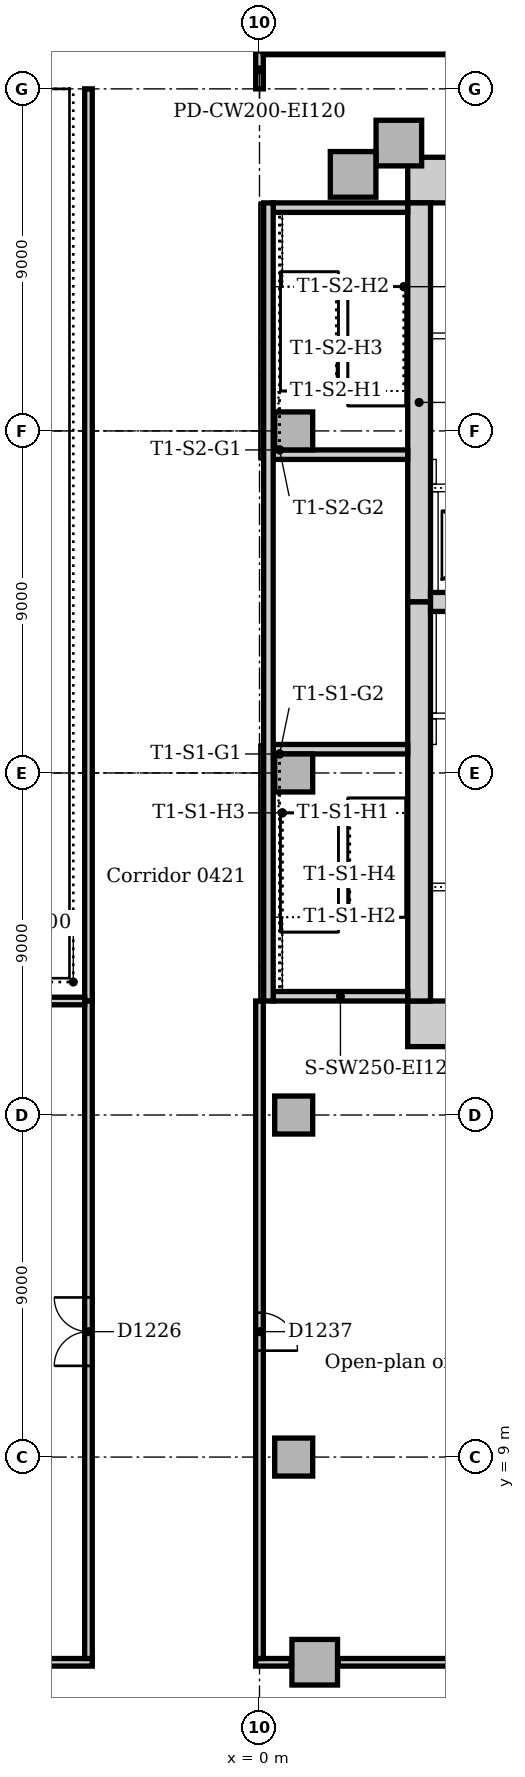
"""IFC4 building model, lengths in metres.
Left out: names, types, materials, properties, quantities, classifications, styles, units other than length and angle.
Written with IfcOpenShell. Run it as: python <this file> out.ifc"""

import sys

from ifc_helpers import new_model, si_unit, direction, frame, frame_2d, origin, origin_2d, place, context, subcontext, project, spatial, rectangle, extrude, element, fill, save


model = new_model("IFC4")
c1 = context("Model", 3, precision=1e-05, world=origin(), true_north=direction((0.0, 1.0)))
c2 = subcontext(c1, "Body", "Model", "MODEL_VIEW")
j1 = project(units=[si_unit("LENGTHUNIT", "METRE"), si_unit("PLANEANGLEUNIT", "RADIAN")], contexts=[c1])
p1 = place(None, origin())
s1 = spatial("IfcSite", under=j1, at=p1, CompositionType="ELEMENT")
p2 = place(p1, origin())
s2 = spatial("IfcBuilding", under=s1, at=p2, CompositionType="ELEMENT")
p3 = place(p2, frame((0.0, 0.0, 21.0)))
s3 = spatial("IfcBuildingStorey", under=s2, at=p3, CompositionType="ELEMENT", Elevation=21.0)
for number, where, z_axis, x_axis in (
    (1, (3.9, 20.4, 0.0), (0.0, 0.0, 1.0), (1.0, 0.0, 0.0)),
    (2, (23.7, 42.6, 0.0), (0.0, 0.0, 1.0), (-1.0, 0.0, 0.0)),
):
    element("IfcWall", number, at=place(p3, frame(where, z_axis=z_axis, x_axis=x_axis)), inside=s3, PredefinedType="SOLIDWALL", context=c2, shape_type="SweptSolid", body=[
        extrude(rectangle(XDim=19.8, YDim=1.2, at=frame_2d((9.9, 0.0))), origin(), (0.0, 0.0, 1.0), 5.0),
    ])
p4 = place(p3, frame((4.2, 42.0, 0.0), z_axis=(0.0, 0.0, 1.0), x_axis=(0.0, -1.0, 0.0)))
e3 = element("IfcWall", 3, at=p4, inside=s3, PredefinedType="SOLIDWALL", context=c2, shape_type="SweptSolid", body=[
    extrude(rectangle(XDim=10.5, YDim=0.6, at=frame_2d((5.25, 0.0))), origin(), (0.0, 0.0, 1.0), 5.0),
])
p5 = place(p4, frame((5.3, 0.0, 0.0)))
e4 = element("IfcOpeningElement", 4, at=p5, cuts=e3, PredefinedType="OPENING", context=c2, shape_type="SweptSolid", body=[
    extrude(rectangle(XDim=1.0, YDim=2.1, at=frame_2d((0.5, 1.05))), frame((0.0, 0.31, 0.0), z_axis=(0.0, -1.0, 0.0), x_axis=(1.0, 0.0, 0.0)), (0.0, 0.0, 1.0), 0.62),
])
p6 = place(p3, frame((4.2, 31.5, 0.0), z_axis=(0.0, 0.0, 1.0), x_axis=(0.0, -1.0, 0.0)))
e5 = element("IfcWall", 5, at=p6, inside=s3, PredefinedType="SOLIDWALL", context=c2, shape_type="SweptSolid", body=[
    extrude(rectangle(XDim=10.5, YDim=0.6, at=frame_2d((5.25, 0.0))), origin(), (0.0, 0.0, 1.0), 5.0),
])
p7 = place(p6, frame((4.25, 0.0, 0.0)))
e6 = element("IfcOpeningElement", 6, at=p7, cuts=e5, PredefinedType="OPENING", context=c2, shape_type="SweptSolid", body=[
    extrude(rectangle(XDim=1.0, YDim=2.1, at=frame_2d((0.5, 1.05))), frame((0.0, 0.31, 0.0), z_axis=(0.0, -1.0, 0.0), x_axis=(1.0, 0.0, 0.0)), (0.0, 0.0, 1.0), 0.62),
])
p8 = place(p3, frame((4.5, 31.5, 0.0), z_axis=(0.0, 0.0, 1.0), x_axis=(1.0, 0.0, 0.0)))
e7 = element("IfcWall", 7, at=p8, inside=s3, PredefinedType="SOLIDWALL", context=c2, shape_type="SweptSolid", body=[
    extrude(rectangle(XDim=18.0, YDim=0.5, at=frame_2d((9.0, 0.0))), origin(), (0.0, 0.0, 1.0), 5.0),
])
p9 = place(p3, frame((0.36, 21.125, 0.0), z_axis=(0.0, 0.0, 1.0), x_axis=(1.0, 0.0, 0.0)))
e8 = element("IfcWall", 8, at=p9, inside=s3, PredefinedType="SOLIDWALL", context=c2, shape_type="SweptSolid", body=[
    extrude(rectangle(XDim=3.54, YDim=0.25, at=frame_2d((1.77, 0.0))), origin(), (0.0, 0.0, 1.0), 5.0),
])
p10 = place(p3, frame((3.9, 27.625, 0.0), z_axis=(0.0, 0.0, 1.0), x_axis=(-1.0, 0.0, 0.0)))
e9 = element("IfcWall", 9, at=p10, inside=s3, PredefinedType="SOLIDWALL", context=c2, shape_type="SweptSolid", body=[
    extrude(rectangle(XDim=3.54, YDim=0.25, at=frame_2d((1.77, 0.0))), origin(), (0.0, 0.0, 1.0), 5.0),
])
p11 = place(p10, frame((0.4, 0.0, 0.0)))
e10 = element("IfcOpeningElement", 10, at=p11, cuts=e9, PredefinedType="OPENING", context=c2, shape_type="SweptSolid", body=[
    extrude(rectangle(XDim=1.0, YDim=2.1, at=frame_2d((0.5, 1.05))), frame((0.0, 0.135, 0.0), z_axis=(0.0, -1.0, 0.0), x_axis=(1.0, 0.0, 0.0)), (0.0, 0.0, 1.0), 0.27),
])
p12 = place(p3, frame((0.36, 35.375, 0.0), z_axis=(0.0, 0.0, 1.0), x_axis=(1.0, 0.0, 0.0)))
e11 = element("IfcWall", 11, at=p12, inside=s3, PredefinedType="SOLIDWALL", context=c2, shape_type="SweptSolid", body=[
    extrude(rectangle(XDim=3.54, YDim=0.25, at=frame_2d((1.77, 0.0))), origin(), (0.0, 0.0, 1.0), 5.0),
])
p13 = place(p12, frame((2.14, 0.0, 0.0)))
e12 = element("IfcOpeningElement", 12, at=p13, cuts=e11, PredefinedType="OPENING", context=c2, shape_type="SweptSolid", body=[
    extrude(rectangle(XDim=1.0, YDim=2.1, at=frame_2d((0.5, 1.05))), frame((0.0, 0.135, 0.0), z_axis=(0.0, -1.0, 0.0), x_axis=(1.0, 0.0, 0.0)), (0.0, 0.0, 1.0), 0.27),
])
p14 = place(p3, frame((3.9, 41.875, 0.0), z_axis=(0.0, 0.0, 1.0), x_axis=(-1.0, 0.0, 0.0)))
e13 = element("IfcWall", 13, at=p14, inside=s3, PredefinedType="SOLIDWALL", context=c2, shape_type="SweptSolid", body=[
    extrude(rectangle(XDim=3.54, YDim=0.25, at=frame_2d((1.77, 0.0))), origin(), (0.0, 0.0, 1.0), 5.0),
])
p15 = place(p3, frame((0.235, 21.0, 0.0), z_axis=(0.0, 0.0, 1.0), x_axis=(0.0, 1.0, 0.0)))
e14 = element("IfcWall", 14, at=p15, inside=s3, PredefinedType="SOLIDWALL", context=c2, shape_type="SweptSolid", body=[
    extrude(rectangle(XDim=21.0, YDim=0.25, at=frame_2d((10.5, 0.0))), origin(), (0.0, 0.0, 1.0), 5.0),
])
for number, where, z_axis, x_axis in (
    (15, (3.667, 43.574, 0.0), (0.0, 0.0, 1.0), (1.0, 0.0, 0.0)),
    (16, (2.463, 42.75, 0.0), (0.0, 0.0, 1.0), (1.0, 0.0, 0.0)),
    (17, (1.453, 3.602, 0.0), (0.0, 0.0, 1.0), (1.0, 0.0, 0.0)),
):
    element("IfcColumn", number, at=place(p3, frame(where, z_axis=z_axis, x_axis=x_axis)), inside=s3, PredefinedType="COLUMN", context=c2, shape_type="SweptSolid", body=[
        extrude(rectangle(XDim=1.2, YDim=1.2, at=origin_2d()), origin(), (0.0, 0.0, 1.0), 4.85),
    ])
for number, where, z_axis, x_axis in (
    (18, (0.9, 9.0, 0.0), (0.0, 0.0, 1.0), (1.0, 0.0, 0.0)),
    (19, (0.9, 18.0, 0.0), (0.0, 0.0, 1.0), (1.0, 0.0, 0.0)),
):
    element("IfcColumn", number, at=place(p3, frame(where, z_axis=z_axis, x_axis=x_axis)), inside=s3, PredefinedType="COLUMN", context=c2, shape_type="SweptSolid", body=[
        extrude(rectangle(XDim=1.0, YDim=1.0, at=origin_2d()), origin(), (0.0, 0.0, 1.0), 4.85),
    ])
for number, where, z_axis, x_axis in (
    (20, (0.9, 27.0, 0.0), (0.0, 0.0, 1.0), (1.0, 0.0, 0.0)),
    (21, (0.9, 36.0, 0.0), (0.0, 0.0, 1.0), (1.0, 0.0, 0.0)),
):
    element("IfcColumn", number, at=place(p3, frame(where, z_axis=z_axis, x_axis=x_axis)), inside=s3, PredefinedType="COLUMN", context=c2, shape_type="SweptSolid", body=[
        extrude(rectangle(XDim=1.0, YDim=1.0, at=origin_2d()), origin(), (0.0, 0.0, 1.0), 5.0),
    ])
p16 = place(p3, frame((-0.1, 3.6, 0.0), z_axis=(0.0, 0.0, 1.0), x_axis=(1.0, 0.0, 0.0)))
e22 = element("IfcWall", 22, at=p16, inside=s3, PredefinedType="PARTITIONING", context=c2, shape_type="SweptSolid", body=[
    extrude(rectangle(XDim=0.933, YDim=0.2, at=frame_2d((0.467, 0.0))), origin(), (0.0, 0.0, 1.0), 4.7),
])
p17 = place(p3, frame((2.073, 3.6, 0.0), z_axis=(0.0, 0.0, 1.0), x_axis=(1.0, 0.0, 0.0)))
e23 = element("IfcWall", 23, at=p17, inside=s3, PredefinedType="PARTITIONING", context=c2, shape_type="SweptSolid", body=[
    extrude(rectangle(XDim=6.927, YDim=0.2, at=frame_2d((3.463, 0.0))), origin(), (0.0, 0.0, 1.0), 4.85),
])
p18 = place(p3, frame((0.0, 45.0, 0.0), z_axis=(0.0, 0.0, 1.0), x_axis=(0.0, 1.0, 0.0)))
e24 = element("IfcWall", 24, at=p18, inside=s3, PredefinedType="PARTITIONING", context=c2, shape_type="SweptSolid", body=[
    extrude(rectangle(XDim=1.0, YDim=0.2, at=frame_2d((0.5, 0.0))), origin(), (0.0, 0.0, 1.0), 4.7),
])
p19 = place(p3, frame((0.1, 46.0, 0.0), z_axis=(0.0, 0.0, 1.0), x_axis=(1.0, 0.0, 0.0)))
e25 = element("IfcWall", 25, at=p19, inside=s3, PredefinedType="PARTITIONING", context=c2, shape_type="SweptSolid", body=[
    extrude(rectangle(XDim=8.9, YDim=0.2, at=frame_2d((4.45, 0.0))), origin(), (0.0, 0.0, 1.0), 4.7),
])
p20 = place(p19, frame((3.9, 0.0, 0.0)))
e26 = element("IfcOpeningElement", 26, at=p20, cuts=e25, PredefinedType="OPENING", context=c2, shape_type="SweptSolid", body=[
    extrude(rectangle(XDim=1.0, YDim=2.1, at=frame_2d((0.5, 1.05))), frame((0.0, 0.11, 0.0), z_axis=(0.0, -1.0, 0.0), x_axis=(1.0, 0.0, 0.0)), (0.0, 0.0, 1.0), 0.22),
])
p21 = place(p3, frame((-18.0, 3.6, 0.0), z_axis=(0.0, 0.0, 1.0), x_axis=(1.0, 0.0, 0.0)))
e27 = element("IfcWall", 27, at=p21, inside=s3, PredefinedType="PARTITIONING", context=c2, shape_type="SweptSolid", body=[
    extrude(rectangle(XDim=13.6, YDim=0.2, at=frame_2d((6.8, 0.0))), origin(), (0.0, 0.0, 1.0), 4.7),
])
p22 = place(p3, frame((-4.5, 21.0, 0.0), z_axis=(0.0, 0.0, 1.0), x_axis=(0.0, 1.0, 0.0)))
e28 = element("IfcWall", 28, at=p22, inside=s3, PredefinedType="PARTITIONING", context=c2, shape_type="SweptSolid", body=[
    extrude(rectangle(XDim=24.0, YDim=0.2, at=frame_2d((12.0, 0.0))), origin(), (0.0, 0.0, 1.0), 4.7),
])
p23 = place(p3, frame((-4.5, 3.7, 0.0), z_axis=(0.0, 0.0, 1.0), x_axis=(0.0, 1.0, 0.0)))
e29 = element("IfcWall", 29, at=p23, inside=s3, PredefinedType="PARTITIONING", context=c2, shape_type="SweptSolid", body=[
    extrude(rectangle(XDim=17.3, YDim=0.2, at=frame_2d((8.65, 0.0))), origin(), (0.0, 0.0, 1.0), 4.7),
])
p24 = place(p23, frame((7.7, 0.0, 0.0)))
e30 = element("IfcOpeningElement", 30, at=p24, cuts=e29, PredefinedType="OPENING", context=c2, shape_type="SweptSolid", body=[
    extrude(rectangle(XDim=1.8, YDim=2.1, at=frame_2d((0.9, 1.05))), frame((0.0, 0.11, 0.0), z_axis=(0.0, -1.0, 0.0), x_axis=(1.0, 0.0, 0.0)), (0.0, 0.0, 1.0), 0.22),
])
p25 = place(p3, frame((0.0, 3.7, 0.0), z_axis=(0.0, 0.0, 1.0), x_axis=(0.0, 1.0, 0.0)))
e31 = element("IfcWall", 31, at=p25, inside=s3, PredefinedType="PARTITIONING", context=c2, shape_type="SweptSolid", body=[
    extrude(rectangle(XDim=17.3, YDim=0.2, at=frame_2d((8.65, 0.0))), origin(), (0.0, 0.0, 1.0), 4.85),
])
p26 = place(p25, frame((8.1, 0.0, 0.0)))
e32 = element("IfcOpeningElement", 32, at=p26, cuts=e31, PredefinedType="OPENING", context=c2, shape_type="SweptSolid", body=[
    extrude(rectangle(XDim=1.0, YDim=2.1, at=frame_2d((0.5, 1.05))), frame((0.0, 0.11, 0.0), z_axis=(0.0, -1.0, 0.0), x_axis=(1.0, 0.0, 0.0)), (0.0, 0.0, 1.0), 0.22),
])
p27 = place(p3, frame((-18.0, 21.0, 0.0), z_axis=(0.0, 0.0, 1.0), x_axis=(1.0, 0.0, 0.0)))
e33 = element("IfcWall", 33, at=p27, inside=s3, PredefinedType="PARTITIONING", context=c2, shape_type="SweptSolid", body=[
    extrude(rectangle(XDim=13.4, YDim=0.2, at=frame_2d((6.7, 0.0))), origin(), (0.0, 0.0, 1.0), 4.7),
])
for number, where, z_axis, x_axis in (
    (34, (0.48, 21.25, 0.0), (0.0, 0.0, 1.0), (0.0, 1.0, 0.0)),
    (35, (0.48, 39.795, 0.0), (0.0, 0.0, 1.0), (0.0, 1.0, 0.0)),
):
    element("IfcWall", number, at=place(p3, frame(where, z_axis=z_axis, x_axis=x_axis)), inside=s3, PredefinedType="STANDARD", context=c2, shape_type="SweptSolid", body=[
        extrude(rectangle(XDim=1.955, YDim=0.24, at=frame_2d((0.978, 0.0))), origin(), (0.0, 0.0, 1.0), 5.0),
    ])
p28 = place(p3, frame((4.5, 24.0, 0.0), z_axis=(0.0, 0.0, 1.0), x_axis=(1.0, 0.0, 0.0)))
e36 = element("IfcWall", 36, at=p28, inside=s3, PredefinedType="PARTITIONING", context=c2, shape_type="SweptSolid", body=[
    extrude(rectangle(XDim=18.0, YDim=0.2, at=frame_2d((9.0, 0.0))), origin(), (0.0, 0.0, 1.0), 4.85),
])
p29 = place(p28, frame((0.95, 0.0, 0.0)))
e37 = element("IfcOpeningElement", 37, at=p29, cuts=e36, PredefinedType="OPENING", context=c2, shape_type="SweptSolid", body=[
    extrude(rectangle(XDim=1.1, YDim=2.1, at=frame_2d((0.55, 1.05))), frame((0.0, 0.11, 0.0), z_axis=(0.0, -1.0, 0.0), x_axis=(1.0, 0.0, 0.0)), (0.0, 0.0, 1.0), 0.22),
])
p30 = place(p28, frame((3.95, 0.0, 0.0)))
e38 = element("IfcOpeningElement", 38, at=p30, cuts=e36, PredefinedType="OPENING", context=c2, shape_type="SweptSolid", body=[
    extrude(rectangle(XDim=1.1, YDim=2.1, at=frame_2d((0.55, 1.05))), frame((0.0, 0.11, 0.0), z_axis=(0.0, -1.0, 0.0), x_axis=(1.0, 0.0, 0.0)), (0.0, 0.0, 1.0), 0.22),
])
p31 = place(p28, frame((6.95, 0.0, 0.0)))
e39 = element("IfcOpeningElement", 39, at=p31, cuts=e36, PredefinedType="OPENING", context=c2, shape_type="SweptSolid", body=[
    extrude(rectangle(XDim=1.1, YDim=2.1, at=frame_2d((0.55, 1.05))), frame((0.0, 0.11, 0.0), z_axis=(0.0, -1.0, 0.0), x_axis=(1.0, 0.0, 0.0)), (0.0, 0.0, 1.0), 0.22),
])
p32 = place(p28, frame((9.95, 0.0, 0.0)))
e40 = element("IfcOpeningElement", 40, at=p32, cuts=e36, PredefinedType="OPENING", context=c2, shape_type="SweptSolid", body=[
    extrude(rectangle(XDim=1.1, YDim=2.1, at=frame_2d((0.55, 1.05))), frame((0.0, 0.11, 0.0), z_axis=(0.0, -1.0, 0.0), x_axis=(1.0, 0.0, 0.0)), (0.0, 0.0, 1.0), 0.22),
])
p33 = place(p28, frame((12.95, 0.0, 0.0)))
e41 = element("IfcOpeningElement", 41, at=p33, cuts=e36, PredefinedType="OPENING", context=c2, shape_type="SweptSolid", body=[
    extrude(rectangle(XDim=1.1, YDim=2.1, at=frame_2d((0.55, 1.05))), frame((0.0, 0.11, 0.0), z_axis=(0.0, -1.0, 0.0), x_axis=(1.0, 0.0, 0.0)), (0.0, 0.0, 1.0), 0.22),
])
p34 = place(p28, frame((15.95, 0.0, 0.0)))
e42 = element("IfcOpeningElement", 42, at=p34, cuts=e36, PredefinedType="OPENING", context=c2, shape_type="SweptSolid", body=[
    extrude(rectangle(XDim=1.1, YDim=2.1, at=frame_2d((0.55, 1.05))), frame((0.0, 0.11, 0.0), z_axis=(0.0, -1.0, 0.0), x_axis=(1.0, 0.0, 0.0)), (0.0, 0.0, 1.0), 0.22),
])
p35 = place(p3, frame((4.5, 34.5, 0.0), z_axis=(0.0, 0.0, 1.0), x_axis=(1.0, 0.0, 0.0)))
e43 = element("IfcWall", 43, at=p35, inside=s3, PredefinedType="PARTITIONING", context=c2, shape_type="SweptSolid", body=[
    extrude(rectangle(XDim=18.0, YDim=0.2, at=frame_2d((9.0, 0.0))), origin(), (0.0, 0.0, 1.0), 4.85),
])
p36 = place(p35, frame((0.95, 0.0, 0.0)))
e44 = element("IfcOpeningElement", 44, at=p36, cuts=e43, PredefinedType="OPENING", context=c2, shape_type="SweptSolid", body=[
    extrude(rectangle(XDim=1.1, YDim=2.1, at=frame_2d((0.55, 1.05))), frame((0.0, 0.11, 0.0), z_axis=(0.0, -1.0, 0.0), x_axis=(1.0, 0.0, 0.0)), (0.0, 0.0, 1.0), 0.22),
])
p37 = place(p35, frame((3.95, 0.0, 0.0)))
e45 = element("IfcOpeningElement", 45, at=p37, cuts=e43, PredefinedType="OPENING", context=c2, shape_type="SweptSolid", body=[
    extrude(rectangle(XDim=1.1, YDim=2.1, at=frame_2d((0.55, 1.05))), frame((0.0, 0.11, 0.0), z_axis=(0.0, -1.0, 0.0), x_axis=(1.0, 0.0, 0.0)), (0.0, 0.0, 1.0), 0.22),
])
p38 = place(p35, frame((12.95, 0.0, 0.0)))
e46 = element("IfcOpeningElement", 46, at=p38, cuts=e43, PredefinedType="OPENING", context=c2, shape_type="SweptSolid", body=[
    extrude(rectangle(XDim=1.1, YDim=2.1, at=frame_2d((0.55, 1.05))), frame((0.0, 0.11, 0.0), z_axis=(0.0, -1.0, 0.0), x_axis=(1.0, 0.0, 0.0)), (0.0, 0.0, 1.0), 0.22),
])
p39 = place(p35, frame((15.95, 0.0, 0.0)))
e47 = element("IfcOpeningElement", 47, at=p39, cuts=e43, PredefinedType="OPENING", context=c2, shape_type="SweptSolid", body=[
    extrude(rectangle(XDim=1.1, YDim=2.1, at=frame_2d((0.55, 1.05))), frame((0.0, 0.11, 0.0), z_axis=(0.0, -1.0, 0.0), x_axis=(1.0, 0.0, 0.0)), (0.0, 0.0, 1.0), 0.22),
])
p40 = place(p3, frame((4.6, 31.75, 0.0), z_axis=(0.0, 0.0, 1.0), x_axis=(0.0, 1.0, 0.0)))
e48 = element("IfcWall", 48, at=p40, inside=s3, PredefinedType="PARTITIONING", context=c2, shape_type="SweptSolid", body=[
    extrude(rectangle(XDim=2.65, YDim=0.2, at=frame_2d((1.325, 0.0))), origin(), (0.0, 0.0, 1.0), 4.85),
])
p41 = place(p3, frame((4.5, 28.5, 0.0), z_axis=(0.0, 0.0, 1.0), x_axis=(1.0, 0.0, 0.0)))
e49 = element("IfcWall", 49, at=p41, inside=s3, PredefinedType="PARTITIONING", context=c2, shape_type="SweptSolid", body=[
    extrude(rectangle(XDim=18.0, YDim=0.15, at=frame_2d((9.0, 0.0))), origin(), (0.0, 0.0, 1.0), 4.85),
])
p42 = place(p41, frame((4.1, 0.0, 0.0)))
e50 = element("IfcOpeningElement", 50, at=p42, cuts=e49, PredefinedType="OPENING", context=c2, shape_type="SweptSolid", body=[
    extrude(rectangle(XDim=0.9, YDim=2.1, at=frame_2d((0.45, 1.05))), frame((0.0, 0.085, 0.0), z_axis=(0.0, -1.0, 0.0), x_axis=(1.0, 0.0, 0.0)), (0.0, 0.0, 1.0), 0.17),
])
p43 = place(p41, frame((10.8, 0.0, 0.0)))
e51 = element("IfcOpeningElement", 51, at=p43, cuts=e49, PredefinedType="OPENING", context=c2, shape_type="SweptSolid", body=[
    extrude(rectangle(XDim=0.9, YDim=2.1, at=frame_2d((0.45, 1.05))), frame((0.0, 0.085, 0.0), z_axis=(0.0, -1.0, 0.0), x_axis=(1.0, 0.0, 0.0)), (0.0, 0.0, 1.0), 0.17),
])
p44 = place(p41, frame((15.2, 0.0, 0.0)))
e52 = element("IfcOpeningElement", 52, at=p44, cuts=e49, PredefinedType="OPENING", context=c2, shape_type="SweptSolid", body=[
    extrude(rectangle(XDim=0.9, YDim=2.1, at=frame_2d((0.45, 1.05))), frame((0.0, 0.085, 0.0), z_axis=(0.0, -1.0, 0.0), x_axis=(1.0, 0.0, 0.0)), (0.0, 0.0, 1.0), 0.17),
])
p45 = place(p3, frame((4.5, 38.5, 0.0), z_axis=(0.0, 0.0, 1.0), x_axis=(1.0, 0.0, 0.0)))
e53 = element("IfcWall", 53, at=p45, inside=s3, PredefinedType="PARTITIONING", context=c2, shape_type="SweptSolid", body=[
    extrude(rectangle(XDim=11.9, YDim=0.15, at=frame_2d((5.95, 0.0))), origin(), (0.0, 0.0, 1.0), 4.85),
])
p46 = place(p45, frame((1.1, 0.0, 0.0)))
e54 = element("IfcOpeningElement", 54, at=p46, cuts=e53, PredefinedType="OPENING", context=c2, shape_type="SweptSolid", body=[
    extrude(rectangle(XDim=0.9, YDim=2.1, at=frame_2d((0.45, 1.05))), frame((0.0, 0.085, 0.0), z_axis=(0.0, -1.0, 0.0), x_axis=(1.0, 0.0, 0.0)), (0.0, 0.0, 1.0), 0.17),
])
p47 = place(p45, frame((4.05, 0.0, 0.0)))
e55 = element("IfcOpeningElement", 55, at=p47, cuts=e53, PredefinedType="OPENING", context=c2, shape_type="SweptSolid", body=[
    extrude(rectangle(XDim=0.9, YDim=2.1, at=frame_2d((0.45, 1.05))), frame((0.0, 0.085, 0.0), z_axis=(0.0, -1.0, 0.0), x_axis=(1.0, 0.0, 0.0)), (0.0, 0.0, 1.0), 0.17),
])
p48 = place(p45, frame((7.05, 0.0, 0.0)))
e56 = element("IfcOpeningElement", 56, at=p48, cuts=e53, PredefinedType="OPENING", context=c2, shape_type="SweptSolid", body=[
    extrude(rectangle(XDim=0.9, YDim=2.1, at=frame_2d((0.45, 1.05))), frame((0.0, 0.085, 0.0), z_axis=(0.0, -1.0, 0.0), x_axis=(1.0, 0.0, 0.0)), (0.0, 0.0, 1.0), 0.17),
])
p49 = place(p45, frame((9.95, 0.0, 0.0)))
e57 = element("IfcOpeningElement", 57, at=p49, cuts=e53, PredefinedType="OPENING", context=c2, shape_type="SweptSolid", body=[
    extrude(rectangle(XDim=0.8, YDim=2.1, at=frame_2d((0.4, 1.05))), frame((0.0, 0.085, 0.0), z_axis=(0.0, -1.0, 0.0), x_axis=(1.0, 0.0, 0.0)), (0.0, 0.0, 1.0), 0.17),
])
p50 = place(p3, frame((4.575, 27.75, 0.0), z_axis=(0.0, 0.0, 1.0), x_axis=(0.0, 1.0, 0.0)))
e58 = element("IfcWall", 58, at=p50, inside=s3, PredefinedType="PARTITIONING", context=c2, shape_type="SweptSolid", body=[
    extrude(rectangle(XDim=0.675, YDim=0.15, at=frame_2d((0.338, 0.0))), origin(), (0.0, 0.0, 1.0), 4.85),
])
p51 = place(p3, frame((4.575, 28.575, 0.0), z_axis=(0.0, 0.0, 1.0), x_axis=(0.0, 1.0, 0.0)))
e59 = element("IfcWall", 59, at=p51, inside=s3, PredefinedType="PARTITIONING", context=c2, shape_type="SweptSolid", body=[
    extrude(rectangle(XDim=2.675, YDim=0.15, at=frame_2d((1.337, 0.0))), origin(), (0.0, 0.0, 1.0), 4.85),
])
p52 = place(p3, frame((4.575, 34.6, 0.0), z_axis=(0.0, 0.0, 1.0), x_axis=(0.0, 1.0, 0.0)))
e60 = element("IfcWall", 60, at=p52, inside=s3, PredefinedType="PARTITIONING", context=c2, shape_type="SweptSolid", body=[
    extrude(rectangle(XDim=0.65, YDim=0.15, at=frame_2d((0.325, 0.0))), origin(), (0.0, 0.0, 1.0), 4.85),
])
p53 = place(p24, origin())
e61 = element("IfcDoor", 61, at=p53, inside=s3, OperationType="DOUBLE_DOOR_SINGLE_SWING", PredefinedType="DOOR", context=c2, shape_type="SweptSolid", body=[
    extrude(rectangle(XDim=1.8, YDim=2.1, at=frame_2d((0.9, 1.05))), frame((0.0, 0.025, 0.0), z_axis=(0.0, -1.0, 0.0), x_axis=(1.0, 0.0, 0.0)), (0.0, 0.0, 1.0), 0.05),
])
fill(e30, e61)
p54 = place(p26, frame((1.0, 0.0, 0.0), z_axis=(0.0, 0.0, 1.0), x_axis=(-1.0, 0.0, 0.0)))
e62 = element("IfcDoor", 62, at=p54, inside=s3, OperationType="SINGLE_SWING_RIGHT", PredefinedType="DOOR", context=c2, shape_type="SweptSolid", body=[
    extrude(rectangle(XDim=1.0, YDim=2.1, at=frame_2d((0.5, 1.05))), frame((0.0, 0.025, 0.0), z_axis=(0.0, -1.0, 0.0), x_axis=(1.0, 0.0, 0.0)), (0.0, 0.0, 1.0), 0.05),
])
fill(e32, e62)
p55 = place(p7, frame((1.0, 0.0, 0.0), z_axis=(0.0, 0.0, 1.0), x_axis=(-1.0, 0.0, 0.0)))
e63 = element("IfcDoor", 63, at=p55, inside=s3, OperationType="SINGLE_SWING_RIGHT", PredefinedType="DOOR", context=c2, shape_type="SweptSolid", body=[
    extrude(rectangle(XDim=1.0, YDim=2.1, at=frame_2d((0.5, 1.05))), frame((0.0, 0.025, 0.0), z_axis=(0.0, -1.0, 0.0), x_axis=(1.0, 0.0, 0.0)), (0.0, 0.0, 1.0), 0.05),
])
fill(e6, e63)
p56 = place(p11, origin())
e64 = element("IfcDoor", 64, at=p56, inside=s3, OperationType="SINGLE_SWING_LEFT", PredefinedType="DOOR", context=c2, shape_type="SweptSolid", body=[
    extrude(rectangle(XDim=1.0, YDim=2.1, at=frame_2d((0.5, 1.05))), frame((0.0, 0.025, 0.0), z_axis=(0.0, -1.0, 0.0), x_axis=(1.0, 0.0, 0.0)), (0.0, 0.0, 1.0), 0.05),
])
fill(e10, e64)
p57 = place(p5, frame((1.0, 0.0, 0.0), z_axis=(0.0, 0.0, 1.0), x_axis=(-1.0, 0.0, 0.0)))
e65 = element("IfcDoor", 65, at=p57, inside=s3, OperationType="SINGLE_SWING_LEFT", PredefinedType="DOOR", context=c2, shape_type="SweptSolid", body=[
    extrude(rectangle(XDim=1.0, YDim=2.1, at=frame_2d((0.5, 1.05))), frame((0.0, 0.025, 0.0), z_axis=(0.0, -1.0, 0.0), x_axis=(1.0, 0.0, 0.0)), (0.0, 0.0, 1.0), 0.05),
])
fill(e4, e65)
p58 = place(p13, origin())
e66 = element("IfcDoor", 66, at=p58, inside=s3, OperationType="SINGLE_SWING_RIGHT", PredefinedType="DOOR", context=c2, shape_type="SweptSolid", body=[
    extrude(rectangle(XDim=1.0, YDim=2.1, at=frame_2d((0.5, 1.05))), frame((0.0, 0.025, 0.0), z_axis=(0.0, -1.0, 0.0), x_axis=(1.0, 0.0, 0.0)), (0.0, 0.0, 1.0), 0.05),
])
fill(e12, e66)
save(model, sys.argv[1])
